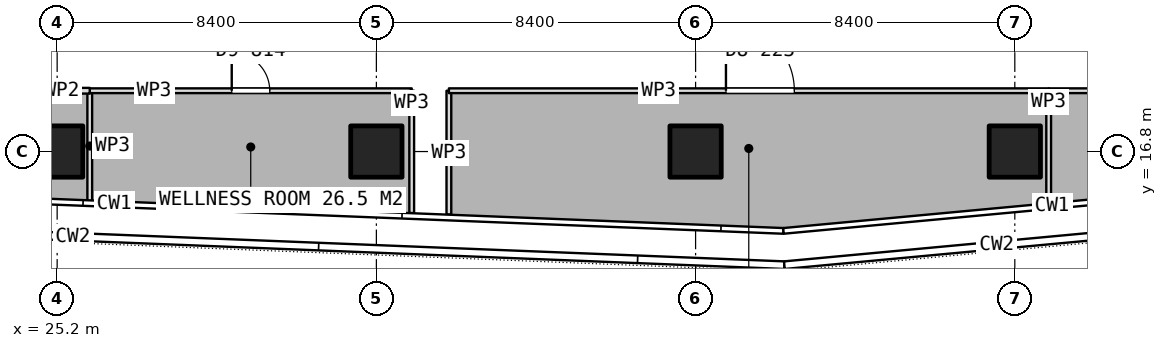
"""IFC4 building model, lengths in metres.
Left out: names, types, materials, properties, quantities, classifications, styles, units other than length and angle.
Written with IfcOpenShell. Run it as: python <this file> out.ifc"""

import sys

from ifc_helpers import new_model, si_unit, direction, frame, frame_2d, origin, origin_2d, place, context, subcontext, project, spatial, rectangle, extrude, element, fill, save


model = new_model("IFC4")
c1 = context("Model", 3, precision=1e-05, world=origin(), true_north=direction((0.0, 1.0)))
c2 = subcontext(c1, "Body", "Model", "MODEL_VIEW")
j1 = project(units=[si_unit("LENGTHUNIT", "METRE"), si_unit("PLANEANGLEUNIT", "RADIAN")], contexts=[c1])
p1 = place(None, origin())
s1 = spatial("IfcSite", under=j1, at=p1, CompositionType="ELEMENT")
p2 = place(p1, origin())
s2 = spatial("IfcBuilding", under=s1, at=p2, CompositionType="ELEMENT")
p3 = place(p2, frame((0.0, 0.0, 202.7)))
s3 = spatial("IfcBuildingStorey", under=s2, at=p3, CompositionType="ELEMENT", Elevation=202.7)
for number, where, z_axis, x_axis in (
    (1, (25.2, 16.8, 0.0), (0.0, 0.0, 1.0), (1.0, 0.0, 0.0)),
    (2, (33.6, 16.8, 0.0), (0.0, 0.0, 1.0), (1.0, 0.0, 0.0)),
    (3, (42.0, 16.8, 0.0), (0.0, 0.0, 1.0), (1.0, 0.0, 0.0)),
    (4, (50.4, 16.8, 0.0), (0.0, 0.0, 1.0), (1.0, 0.0, 0.0)),
):
    element("IfcColumn", number, at=place(p3, frame(where, z_axis=z_axis, x_axis=x_axis)), inside=s3, PredefinedType="COLUMN", context=c2, shape_type="SweptSolid", body=[
        extrude(rectangle(XDim=1.35, YDim=1.35, at=origin_2d()), origin(), (0.0, 0.0, 1.0), 3.75),
    ])
p4 = place(p3, frame((51.291, 15.442, 0.0), z_axis=(0.0, 0.0, 1.0), x_axis=(0.0, 1.0, 0.0)))
e5 = element("IfcWall", 5, at=p4, inside=s3, PredefinedType="PARTITIONING", context=c2, shape_type="SweptSolid", body=[
    extrude(rectangle(XDim=2.958, YDim=0.125, at=frame_2d((1.479, 0.0))), origin(), (0.0, 0.0, 1.0), 3.5),
])
p5 = place(p3, frame((51.291, 18.4, 0.0), z_axis=(0.0, 0.0, 1.0), x_axis=(1.0, 0.0, 0.0)))
e6 = element("IfcWall", 6, at=p5, inside=s3, PredefinedType="PARTITIONING", context=c2, shape_type="SweptSolid", body=[
    extrude(rectangle(XDim=5.109, YDim=0.125, at=frame_2d((2.554, 0.0))), origin(), (0.0, 0.0, 1.0), 3.5),
])
p6 = place(p5, frame((2.055, 0.0, 0.0)))
e7 = element("IfcOpeningElement", 7, at=p6, cuts=e6, PredefinedType="OPENING", context=c2, shape_type="SweptSolid", body=[
    extrude(rectangle(XDim=1.0, YDim=2.1, at=frame_2d((0.5, 1.05))), frame((0.0, 0.073, 0.0), z_axis=(0.0, -1.0, 0.0), x_axis=(1.0, 0.0, 0.0)), (0.0, 0.0, 1.0), 0.145),
])
p7 = place(p3, frame((26.058, 15.49, 0.0), z_axis=(0.0, 0.0, 1.0), x_axis=(0.0, 1.0, 0.0)))
e8 = element("IfcWall", 8, at=p7, inside=s3, PredefinedType="PARTITIONING", context=c2, shape_type="SweptSolid", body=[
    extrude(rectangle(XDim=2.91, YDim=0.125, at=frame_2d((1.455, 0.0))), origin(), (0.0, 0.0, 1.0), 3.5),
])
p8 = place(p3, frame((26.058, 18.4, 0.0), z_axis=(0.0, 0.0, 1.0), x_axis=(1.0, 0.0, 0.0)))
e9 = element("IfcWall", 9, at=p8, inside=s3, PredefinedType="PARTITIONING", context=c2, shape_type="SweptSolid", body=[
    extrude(rectangle(XDim=8.472, YDim=0.125, at=frame_2d((4.236, 0.0))), origin(), (0.0, 0.0, 1.0), 3.5),
])
p9 = place(p8, frame((3.736, 0.0, 0.0)))
e10 = element("IfcOpeningElement", 10, at=p9, cuts=e9, PredefinedType="OPENING", context=c2, shape_type="SweptSolid", body=[
    extrude(rectangle(XDim=1.0, YDim=2.1, at=frame_2d((0.5, 1.05))), frame((0.0, 0.073, 0.0), z_axis=(0.0, -1.0, 0.0), x_axis=(1.0, 0.0, 0.0)), (0.0, 0.0, 1.0), 0.145),
])
p10 = place(p3, frame((34.53, 18.4, 0.0), z_axis=(0.0, 0.0, 1.0), x_axis=(0.0, -1.0, 0.0)))
e11 = element("IfcWall", 11, at=p10, inside=s3, PredefinedType="PARTITIONING", context=c2, shape_type="SweptSolid", body=[
    extrude(rectangle(XDim=3.218, YDim=0.125, at=frame_2d((1.609, 0.0))), origin(), (0.0, 0.0, 1.0), 3.5),
])
p11 = place(p3, frame((22.4, 18.4, 0.0), z_axis=(0.0, 0.0, 1.0), x_axis=(1.0, 0.0, 0.0)))
e12 = element("IfcWall", 12, at=p11, inside=s3, PredefinedType="PARTITIONING", context=c2, shape_type="SweptSolid", body=[
    extrude(rectangle(XDim=3.658, YDim=0.15, at=frame_2d((1.829, 0.0))), origin(), (0.0, 0.0, 1.0), 3.5),
])
p12 = place(p11, frame((1.029, 0.0, 0.0)))
e13 = element("IfcOpeningElement", 13, at=p12, cuts=e12, PredefinedType="OPENING", context=c2, shape_type="SweptSolid", body=[
    extrude(rectangle(XDim=1.0, YDim=2.1, at=frame_2d((0.5, 1.05))), frame((0.0, 0.085, 0.0), z_axis=(0.0, -1.0, 0.0), x_axis=(1.0, 0.0, 0.0)), (0.0, 0.0, 1.0), 0.17),
])
p13 = place(p3, frame((35.508, 15.143, 0.0), z_axis=(0.0, 0.0, 1.0), x_axis=(0.0, 1.0, 0.0)))
e14 = element("IfcWall", 14, at=p13, inside=s3, PredefinedType="PARTITIONING", context=c2, shape_type="SweptSolid", body=[
    extrude(rectangle(XDim=3.257, YDim=0.125, at=frame_2d((1.628, 0.0))), origin(), (0.0, 0.0, 1.0), 3.5),
])
p14 = place(p3, frame((35.508, 18.4, 0.0), z_axis=(0.0, 0.0, 1.0), x_axis=(1.0, 0.0, 0.0)))
e15 = element("IfcWall", 15, at=p14, inside=s3, PredefinedType="PARTITIONING", context=c2, shape_type="SweptSolid", body=[
    extrude(rectangle(XDim=15.783, YDim=0.125, at=frame_2d((7.892, 0.0))), origin(), (0.0, 0.0, 1.0), 3.5),
])
p15 = place(p14, frame((7.291, 0.0, 0.0)))
e16 = element("IfcOpeningElement", 16, at=p15, cuts=e15, PredefinedType="OPENING", context=c2, shape_type="SweptSolid", body=[
    extrude(rectangle(XDim=1.8, YDim=2.1, at=frame_2d((0.9, 1.05))), frame((0.0, 0.073, 0.0), z_axis=(0.0, -1.0, 0.0), x_axis=(1.0, 0.0, 0.0)), (0.0, 0.0, 1.0), 0.145),
])
p16 = place(p9, origin())
e17 = element("IfcDoor", 17, at=p16, inside=s3, OperationType="SINGLE_SWING_LEFT", PredefinedType="DOOR", context=c2, shape_type="SweptSolid", body=[
    extrude(rectangle(XDim=1.0, YDim=2.1, at=frame_2d((0.5, 1.05))), frame((0.0, 0.025, 0.0), z_axis=(0.0, -1.0, 0.0), x_axis=(1.0, 0.0, 0.0)), (0.0, 0.0, 1.0), 0.05),
])
fill(e10, e17)
p17 = place(p15, origin())
e18 = element("IfcDoor", 18, at=p17, inside=s3, OperationType="DOUBLE_DOOR_SINGLE_SWING", PredefinedType="DOOR", context=c2, shape_type="SweptSolid", body=[
    extrude(rectangle(XDim=1.8, YDim=2.1, at=frame_2d((0.9, 1.05))), frame((0.0, 0.025, 0.0), z_axis=(0.0, -1.0, 0.0), x_axis=(1.0, 0.0, 0.0)), (0.0, 0.0, 1.0), 0.05),
])
fill(e16, e18)
save(model, sys.argv[1])
